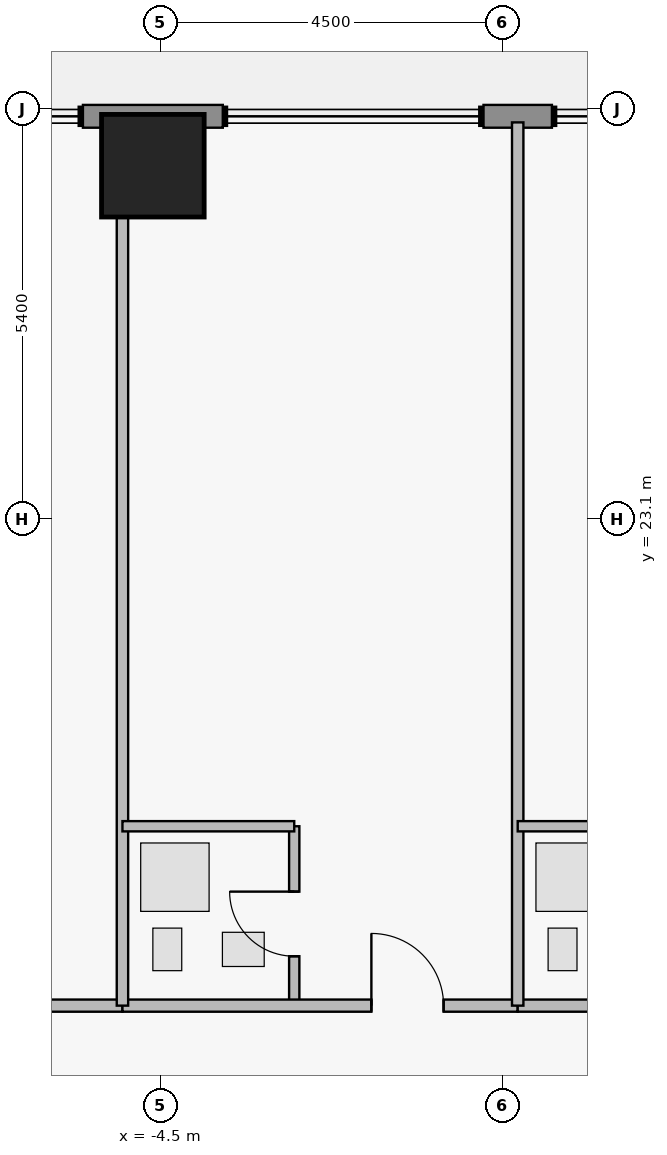
"""IFC4 building model, lengths in metres.
Left out: names, types, materials, properties, quantities, classifications, styles, units other than length and angle.
Written with IfcOpenShell. Run it as: python <this file> out.ifc"""

import sys

from ifc_helpers import new_model, si_unit, direction, frame, frame_2d, origin, origin_2d, place, context, subcontext, project, spatial, rectangle, extrude, element, fill, save


model = new_model("IFC4")
c1 = context("Model", 3, precision=1e-05, world=origin(), true_north=direction((0.0, 1.0)))
c2 = subcontext(c1, "Body", "Model", "MODEL_VIEW")
j1 = project(units=[si_unit("LENGTHUNIT", "METRE"), si_unit("PLANEANGLEUNIT", "RADIAN")], contexts=[c1])
p1 = place(None, origin())
s1 = spatial("IfcSite", under=j1, at=p1, CompositionType="ELEMENT")
p2 = place(p1, origin())
s2 = spatial("IfcBuilding", under=s1, at=p2, CompositionType="ELEMENT")
p3 = place(p2, frame((0.0, 0.0, 106.6)))
s3 = spatial("IfcBuildingStorey", under=s2, at=p3, CompositionType="ELEMENT", Elevation=106.6)
p4 = place(p3, frame((-4.6, 27.75, 0.0), z_axis=(0.0, 0.0, 1.0), x_axis=(1.0, 0.0, 0.0)))
e1 = element("IfcColumn", 1, at=p4, inside=s3, PredefinedType="COLUMN", context=c2, shape_type="SweptSolid", body=[
    extrude(rectangle(XDim=1.35, YDim=1.35, at=origin_2d()), origin(), (0.0, 0.0, 1.0), 3.65),
])
p5 = place(p3, frame((-5.52, 28.4, 0.0), z_axis=(0.0, 0.0, 1.0), x_axis=(1.0, 0.0, 0.0)))
e2 = element("IfcWall", 2, at=p5, inside=s3, PredefinedType="STANDARD", context=c2, shape_type="SweptSolid", body=[
    extrude(rectangle(XDim=1.84, YDim=0.3, at=frame_2d((0.92, 0.0))), origin(), (0.0, 0.0, 1.0), 3.43),
])
p6 = place(p3, frame((-0.25, 28.4, 0.0), z_axis=(0.0, 0.0, 1.0), x_axis=(1.0, 0.0, 0.0)))
e3 = element("IfcWall", 3, at=p6, inside=s3, PredefinedType="STANDARD", context=c2, shape_type="SweptSolid", body=[
    extrude(rectangle(XDim=0.9, YDim=0.3, at=frame_2d((0.45, 0.0))), origin(), (0.0, 0.0, 1.0), 3.43),
])
p7 = place(p3, frame((-10.2, 16.7, 0.0), z_axis=(0.0, 0.0, 1.0), x_axis=(1.0, 0.0, 0.0)))
e4 = element("IfcWall", 4, at=p7, inside=s3, PredefinedType="PARTITIONING", context=c2, shape_type="SweptSolid", body=[
    extrude(rectangle(XDim=5.2, YDim=0.16, at=frame_2d((2.6, 0.0))), origin(), (0.0, 0.0, 1.0), 2.973),
])
p8 = place(p7, frame((3.275, 0.0, 0.0)))
e5 = element("IfcOpeningElement", 5, at=p8, cuts=e4, PredefinedType="OPENING", context=c2, shape_type="SweptSolid", body=[
    extrude(rectangle(XDim=0.95, YDim=2.15, at=frame_2d((0.475, 1.075))), frame((0.0, 0.09, 0.0), z_axis=(0.0, -1.0, 0.0), x_axis=(1.0, 0.0, 0.0)), (0.0, 0.0, 1.0), 0.18),
])
p9 = place(p3, frame((-2.74, 16.7, 0.0), z_axis=(0.0, 0.0, 1.0), x_axis=(0.0, 1.0, 0.0)))
e6 = element("IfcWall", 6, at=p9, inside=s3, PredefinedType="PLUMBINGWALL", context=c2, shape_type="SweptSolid", body=[
    extrude(rectangle(XDim=2.36, YDim=0.135, at=frame_2d((1.18, 0.0))), origin(), (0.0, 0.0, 1.0), 3.43),
])
p10 = place(p9, frame((0.65, 0.0, 0.0)))
e7 = element("IfcOpeningElement", 7, at=p10, cuts=e6, PredefinedType="OPENING", context=c2, shape_type="SweptSolid", body=[
    extrude(rectangle(XDim=0.85, YDim=2.1, at=frame_2d((0.425, 1.05))), frame((0.0, 0.077, 0.0), z_axis=(0.0, -1.0, 0.0), x_axis=(1.0, 0.0, 0.0)), (0.0, 0.0, 1.0), 0.155),
])
p11 = place(p3, frame((-5.0, 16.7, 0.0), z_axis=(0.0, 0.0, 1.0), x_axis=(1.0, 0.0, 0.0)))
e8 = element("IfcWall", 8, at=p11, inside=s3, PredefinedType="PARTITIONING", context=c2, shape_type="SweptSolid", body=[
    extrude(rectangle(XDim=5.2, YDim=0.16, at=frame_2d((2.6, 0.0))), origin(), (0.0, 0.0, 1.0), 2.973),
])
p12 = place(p11, frame((3.275, 0.0, 0.0)))
e9 = element("IfcOpeningElement", 9, at=p12, cuts=e8, PredefinedType="OPENING", context=c2, shape_type="SweptSolid", body=[
    extrude(rectangle(XDim=0.95, YDim=2.15, at=frame_2d((0.475, 1.075))), frame((0.0, 0.09, 0.0), z_axis=(0.0, -1.0, 0.0), x_axis=(1.0, 0.0, 0.0)), (0.0, 0.0, 1.0), 0.18),
])
p13 = place(p3, frame((0.2, 16.7, 0.0), z_axis=(0.0, 0.0, 1.0), x_axis=(1.0, 0.0, 0.0)))
e10 = element("IfcWall", 10, at=p13, inside=s3, PredefinedType="PARTITIONING", context=c2, shape_type="SweptSolid", body=[
    extrude(rectangle(XDim=5.2, YDim=0.16, at=frame_2d((2.6, 0.0))), origin(), (0.0, 0.0, 1.0), 2.973),
])
p14 = place(p13, frame((3.275, 0.0, 0.0)))
e11 = element("IfcOpeningElement", 11, at=p14, cuts=e10, PredefinedType="OPENING", context=c2, shape_type="SweptSolid", body=[
    extrude(rectangle(XDim=0.95, YDim=2.15, at=frame_2d((0.475, 1.075))), frame((0.0, 0.09, 0.0), z_axis=(0.0, -1.0, 0.0), x_axis=(1.0, 0.0, 0.0)), (0.0, 0.0, 1.0), 0.18),
])
p15 = place(p3, frame((-5.0, 16.7, 0.0), z_axis=(0.0, 0.0, 1.0), x_axis=(0.0, 1.0, 0.0)))
e12 = element("IfcWall", 12, at=p15, inside=s3, PredefinedType="PARTITIONING", context=c2, shape_type="SweptSolid", body=[
    extrude(rectangle(XDim=11.62, YDim=0.15, at=frame_2d((5.81, 0.0))), origin(), (0.0, 0.0, 1.0), 2.503),
])
p16 = place(p3, frame((-5.0, 19.06, 0.0), z_axis=(0.0, 0.0, 1.0), x_axis=(1.0, 0.0, 0.0)))
e13 = element("IfcWall", 13, at=p16, inside=s3, PredefinedType="PLUMBINGWALL", context=c2, shape_type="SweptSolid", body=[
    extrude(rectangle(XDim=2.26, YDim=0.135, at=frame_2d((1.13, 0.0))), origin(), (0.0, 0.0, 1.0), 2.973),
])
p17 = place(p3, frame((0.2, 16.7, 0.0), z_axis=(0.0, 0.0, 1.0), x_axis=(0.0, 1.0, 0.0)))
e14 = element("IfcWall", 14, at=p17, inside=s3, PredefinedType="PARTITIONING", context=c2, shape_type="SweptSolid", body=[
    extrude(rectangle(XDim=11.62, YDim=0.15, at=frame_2d((5.81, 0.0))), origin(), (0.0, 0.0, 1.0), 3.43),
])
p18 = place(p3, frame((0.2, 19.06, 0.0), z_axis=(0.0, 0.0, 1.0), x_axis=(1.0, 0.0, 0.0)))
e15 = element("IfcWall", 15, at=p18, inside=s3, PredefinedType="PLUMBINGWALL", context=c2, shape_type="SweptSolid", body=[
    extrude(rectangle(XDim=2.26, YDim=0.135, at=frame_2d((1.13, 0.0))), origin(), (0.0, 0.0, 1.0), 2.973),
])
p19 = place(p10, origin())
e16 = element("IfcDoor", 16, at=p19, inside=s3, OperationType="SINGLE_SWING_RIGHT", PredefinedType="DOOR", context=c2, shape_type="SweptSolid", body=[
    extrude(rectangle(XDim=0.85, YDim=2.1, at=frame_2d((0.425, 1.05))), frame((0.0, 0.025, 0.0), z_axis=(0.0, -1.0, 0.0), x_axis=(1.0, 0.0, 0.0)), (0.0, 0.0, 1.0), 0.05),
])
fill(e7, e16)
p20 = place(p12, origin())
e17 = element("IfcDoor", 17, at=p20, inside=s3, OperationType="SINGLE_SWING_LEFT", PredefinedType="DOOR", context=c2, shape_type="SweptSolid", body=[
    extrude(rectangle(XDim=0.95, YDim=2.15, at=frame_2d((0.475, 1.075))), frame((0.0, 0.025, 0.0), z_axis=(0.0, -1.0, 0.0), x_axis=(1.0, 0.0, 0.0)), (0.0, 0.0, 1.0), 0.05),
])
fill(e9, e17)
save(model, sys.argv[1])
